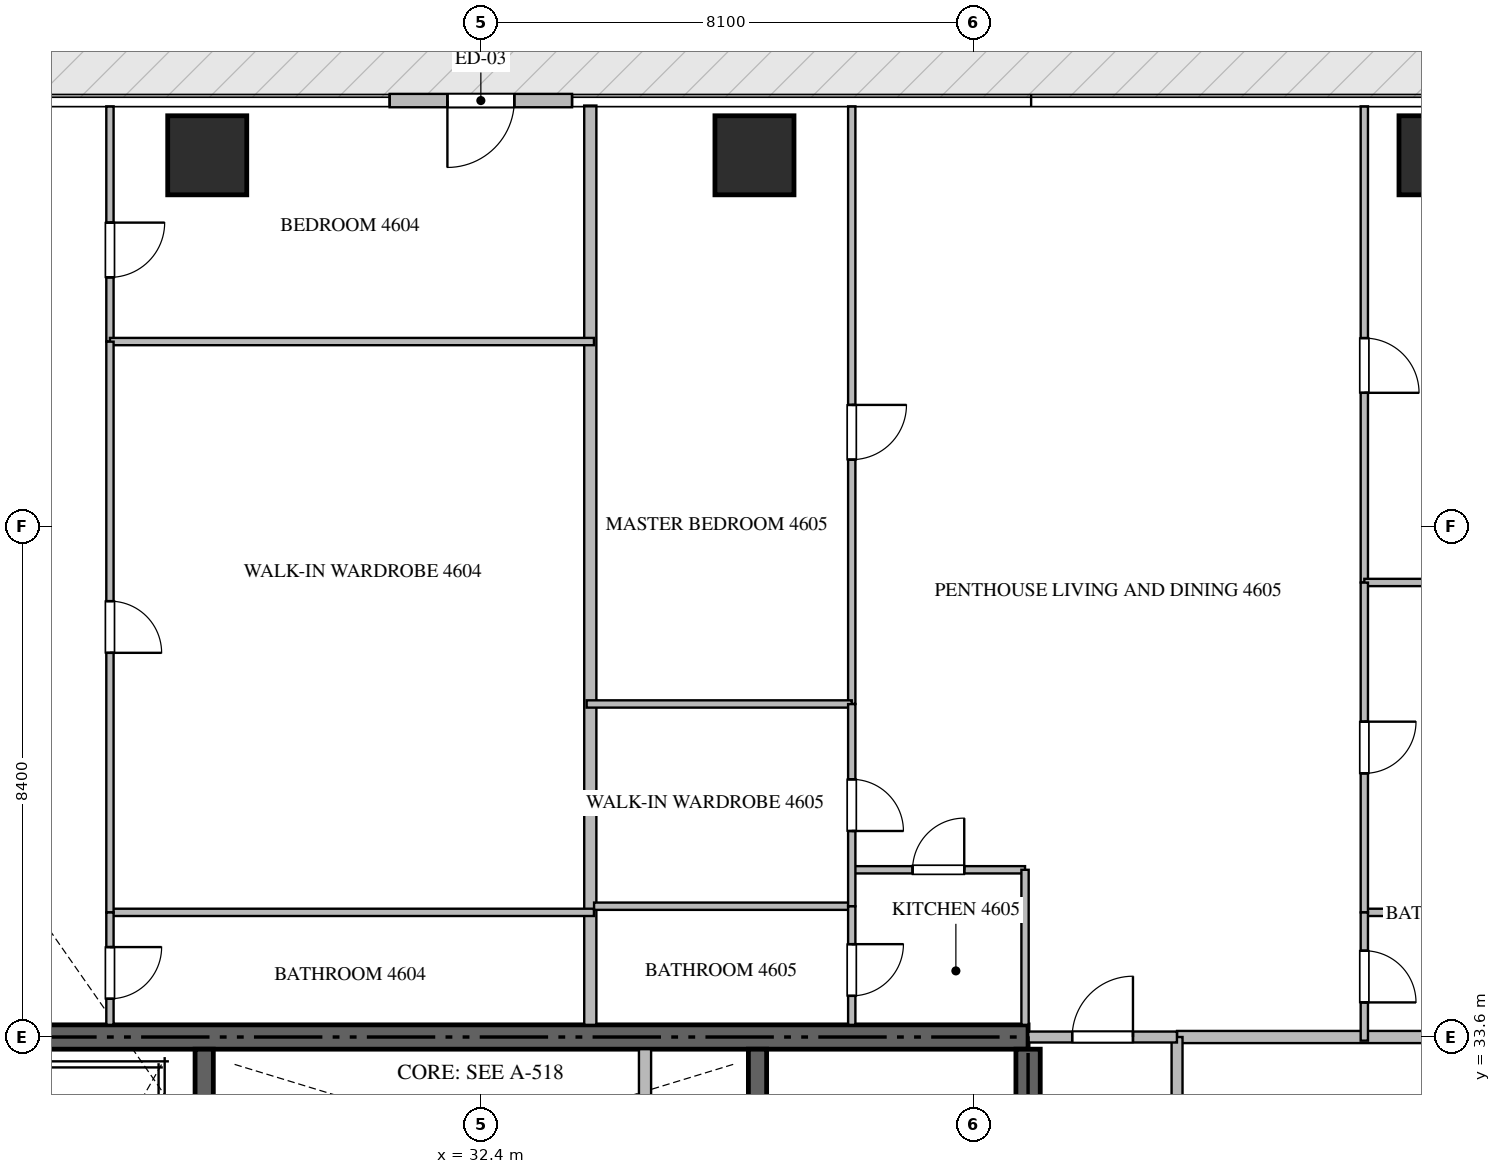
"""IFC4 building model, lengths in metres.
Left out: names, types, materials, properties, quantities, classifications, styles, units other than length and angle.
Written with IfcOpenShell. Run it as: python <this file> out.ifc"""

import sys

from ifc_helpers import new_model, si_unit, direction, frame, frame_2d, origin, origin_2d, place, context, subcontext, project, spatial, rectangle, extrude, source, transform, mapped, element, fill, save


model = new_model("IFC4")
c1 = context("Model", 3, precision=1e-05, world=origin(), true_north=direction((0.0, 1.0)))
c2 = subcontext(c1, "Body", "Model", "MODEL_VIEW")
j1 = project(units=[si_unit("LENGTHUNIT", "METRE"), si_unit("PLANEANGLEUNIT", "RADIAN")], contexts=[c1])
p1 = place(None, origin())
s1 = spatial("IfcSite", under=j1, at=p1, CompositionType="ELEMENT")
p2 = place(p1, origin())
s2 = spatial("IfcBuilding", under=s1, at=p2, CompositionType="ELEMENT")
p3 = place(p2, frame((0.0, 0.0, 183.9)))
s3 = spatial("IfcBuildingStorey", under=s2, at=p3, CompositionType="ELEMENT", Elevation=183.9)
p4 = place(p3, frame((41.4, 33.6, -0.26), z_axis=(0.0, 0.0, 1.0), x_axis=(-1.0, 0.0, 0.0)))
e1 = element("IfcWall", 1, at=p4, inside=s3, PredefinedType="SHEAR", context=c2, shape_type="SweptSolid", body=[
    extrude(rectangle(XDim=18.0, YDim=0.4, at=frame_2d((9.0, 0.0))), origin(), (0.0, 0.0, 1.0), 3.748),
])
p5 = place(p3, frame((41.4, 27.75, -0.26), z_axis=(0.0, 0.0, 1.0), x_axis=(0.0, 1.0, 0.0)))
e2 = element("IfcWall", 2, at=p5, inside=s3, PredefinedType="SHEAR", context=c2, shape_type="SweptSolid", body=[
    extrude(rectangle(XDim=5.65, YDim=0.4, at=frame_2d((2.825, 0.0))), origin(), (0.0, 0.0, 1.0), 3.748),
])
p6 = place(p3, frame((27.85, 23.55, -0.26), z_axis=(0.0, 0.0, 1.0), x_axis=(0.0, 1.0, 0.0)))
e3 = element("IfcWall", 3, at=p6, inside=s3, PredefinedType="SHEAR", context=c2, shape_type="SweptSolid", body=[
    extrude(rectangle(XDim=9.85, YDim=0.3, at=frame_2d((4.925, 0.0))), origin(), (0.0, 0.0, 1.0), 3.748),
])
p7 = place(p3, frame((36.95, 27.05, -0.26), z_axis=(0.0, 0.0, 1.0), x_axis=(0.0, 1.0, 0.0)))
e4 = element("IfcWall", 4, at=p7, inside=s3, PredefinedType="SHEAR", context=c2, shape_type="SweptSolid", body=[
    extrude(rectangle(XDim=6.35, YDim=0.3, at=frame_2d((3.175, 0.0))), origin(), (0.0, 0.0, 1.0), 3.748),
])
m1 = source(origin(), c2, "Body", "SweptSolid", [
    extrude(rectangle(XDim=1.3, YDim=1.3, at=origin_2d()), origin(), (0.0, 0.0, 1.0), 3.75),
])
for number, where, z_axis, x_axis in (
    (5, (27.9, 48.1, -0.26), (0.0, 0.0, 1.0), (1.0, 0.0, 0.0)),
    (6, (36.9, 48.1, -0.26), (0.0, 0.0, 1.0), (1.0, 0.0, 0.0)),
    (7, (48.15, 48.1, -0.26), (0.0, 0.0, 1.0), (1.0, 0.0, 0.0)),
):
    element("IfcColumn", number, at=place(p3, frame(where, z_axis=z_axis, x_axis=x_axis)), inside=s3, PredefinedType="COLUMN", context=c2, shape_type="MappedRepresentation", body=[
        mapped(m1, transform((0.0, 0.0, 0.0), scale=1.0)),
    ])
p8 = place(p3, frame((33.9, 49.0, 0.0), z_axis=(0.0, 0.0, 1.0), x_axis=(-1.0, 0.0, 0.0)))
e8 = element("IfcWall", 8, at=p8, inside=s3, PredefinedType="ELEMENTEDWALL", context=c2, shape_type="SweptSolid", body=[
    extrude(rectangle(XDim=3.0, YDim=0.22, at=frame_2d((1.5, 0.0))), origin(), (0.0, 0.0, 1.0), 3.475),
])
p9 = place(p8, frame((0.95, 0.0, 0.0)))
e9 = element("IfcOpeningElement", 9, at=p9, cuts=e8, PredefinedType="OPENING", context=c2, shape_type="SweptSolid", body=[
    extrude(rectangle(XDim=1.1, YDim=2.2, at=frame_2d((0.55, 1.1))), frame((0.0, 0.12, 0.0), z_axis=(0.0, -1.0, 0.0), x_axis=(1.0, 0.0, 0.0)), (0.0, 0.0, 1.0), 0.24),
])
p10 = place(p3, frame((35.1, 30.75, 0.0), z_axis=(0.0, 0.0, 1.0), x_axis=(0.0, 1.0, 0.0)))
e10 = element("IfcWall", 10, at=p10, inside=s3, PredefinedType="STANDARD", context=c2, shape_type="SweptSolid", body=[
    extrude(rectangle(XDim=2.65, YDim=0.2, at=frame_2d((1.325, 0.0))), origin(), (0.0, 0.0, 1.0), 3.49),
])
p11 = place(p3, frame((34.2, 33.8, 0.0), z_axis=(0.0, 0.0, 1.0), x_axis=(0.0, 1.0, 0.0)))
e11 = element("IfcWall", 11, at=p11, inside=s3, PredefinedType="PARTITIONING", context=c2, shape_type="SweptSolid", body=[
    extrude(rectangle(XDim=15.118, YDim=0.2, at=frame_2d((7.559, 0.0))), origin(), (0.0, 0.0, 1.0), 3.49),
])
p12 = place(p3, frame((43.85, 33.6, 0.0), z_axis=(0.0, 0.0, 1.0), x_axis=(1.0, 0.0, 0.0)))
e12 = element("IfcWall", 12, at=p12, inside=s3, PredefinedType="PARTITIONING", context=c2, shape_type="SweptSolid", body=[
    extrude(rectangle(XDim=13.068, YDim=0.2, at=frame_2d((6.534, 0.0))), origin(), (0.0, 0.0, 1.0), 3.49),
])
p13 = place(p3, frame((43.85, 14.9, 0.0), z_axis=(0.0, 0.0, 1.0), x_axis=(0.0, 1.0, 0.0)))
e13 = element("IfcWall", 13, at=p13, inside=s3, PredefinedType="PARTITIONING", context=c2, shape_type="SweptSolid", body=[
    extrude(rectangle(XDim=18.7, YDim=0.18, at=frame_2d((9.35, 0.0))), origin(), (0.0, 0.0, 1.0), 3.49),
])
p14 = place(p13, frame((1.805, 0.0, 0.0)))
e14 = element("IfcOpeningElement", 14, at=p14, cuts=e13, PredefinedType="OPENING", context=c2, shape_type="SweptSolid", body=[
    extrude(rectangle(XDim=1.0, YDim=2.15, at=frame_2d((0.5, 1.075))), frame((0.0, 0.1, 0.0), z_axis=(0.0, -1.0, 0.0), x_axis=(1.0, 0.0, 0.0)), (0.0, 0.0, 1.0), 0.2),
])
p15 = place(p13, frame((14.726, 0.0, 0.0)))
e15 = element("IfcOpeningElement", 15, at=p15, cuts=e13, PredefinedType="OPENING", context=c2, shape_type="SweptSolid", body=[
    extrude(rectangle(XDim=1.0, YDim=2.15, at=frame_2d((0.5, 1.075))), frame((0.0, 0.1, 0.0), z_axis=(0.0, -1.0, 0.0), x_axis=(1.0, 0.0, 0.0)), (0.0, 0.0, 1.0), 0.2),
])
p16 = place(p3, frame((41.402, 33.6, 0.0), z_axis=(0.0, 0.0, 1.0), x_axis=(1.0, 0.0, 0.0)))
e16 = element("IfcWall", 16, at=p16, inside=s3, PredefinedType="PARTITIONING", context=c2, shape_type="SweptSolid", body=[
    extrude(rectangle(XDim=2.446, YDim=0.18, at=frame_2d((1.223, 0.0))), origin(), (0.0, 0.0, 1.0), 3.49),
])
p17 = place(p16, frame((0.723, 0.0, 0.0)))
e17 = element("IfcOpeningElement", 17, at=p17, cuts=e16, PredefinedType="OPENING", context=c2, shape_type="SweptSolid", body=[
    extrude(rectangle(XDim=1.0, YDim=2.15, at=frame_2d((0.5, 1.075))), frame((0.0, 0.1, 0.0), z_axis=(0.0, -1.0, 0.0), x_axis=(1.0, 0.0, 0.0)), (0.0, 0.0, 1.0), 0.2),
])
p18 = place(p3, frame((26.3, 48.905, 0.0), z_axis=(0.0, 0.0, 1.0), x_axis=(0.0, -1.0, 0.0)))
e18 = element("IfcWall", 18, at=p18, inside=s3, PredefinedType="PARTITIONING", context=c2, shape_type="SweptSolid", body=[
    extrude(rectangle(XDim=3.868, YDim=0.12, at=frame_2d((1.934, 0.0))), origin(), (0.0, 0.0, 1.0), 3.49),
])
p19 = place(p18, frame((1.912, 0.0, 0.0)))
e19 = element("IfcOpeningElement", 19, at=p19, cuts=e18, PredefinedType="OPENING", context=c2, shape_type="SweptSolid", body=[
    extrude(rectangle(XDim=0.9, YDim=2.1, at=frame_2d((0.45, 1.05))), frame((0.0, 0.07, 0.0), z_axis=(0.0, -1.0, 0.0), x_axis=(1.0, 0.0, 0.0)), (0.0, 0.0, 1.0), 0.14),
])
for number, where, z_axis, x_axis in (
    (20, (26.3, 45.037, 0.0), (0.0, 0.0, 1.0), (1.0, 0.0, 0.0)),
    (21, (26.3, 35.65, 0.0), (0.0, 0.0, 1.0), (1.0, 0.0, 0.0)),
):
    element("IfcWall", number, at=place(p3, frame(where, z_axis=z_axis, x_axis=x_axis)), inside=s3, PredefinedType="PARTITIONING", context=c2, shape_type="SweptSolid", body=[
        extrude(rectangle(XDim=7.96, YDim=0.12, at=frame_2d((3.98, 0.0))), origin(), (0.0, 0.0, 1.0), 3.49),
    ])
p20 = place(p3, frame((26.3, 45.035, 0.0), z_axis=(0.0, 0.0, 1.0), x_axis=(0.0, -1.0, 0.0)))
e22 = element("IfcWall", 22, at=p20, inside=s3, PredefinedType="PARTITIONING", context=c2, shape_type="SweptSolid", body=[
    extrude(rectangle(XDim=9.385, YDim=0.12, at=frame_2d((4.692, 0.0))), origin(), (0.0, 0.0, 1.0), 3.49),
])
p21 = place(p20, frame((4.267, 0.0, 0.0)))
e23 = element("IfcOpeningElement", 23, at=p21, cuts=e22, PredefinedType="OPENING", context=c2, shape_type="SweptSolid", body=[
    extrude(rectangle(XDim=0.85, YDim=2.1, at=frame_2d((0.425, 1.05))), frame((0.0, 0.07, 0.0), z_axis=(0.0, -1.0, 0.0), x_axis=(1.0, 0.0, 0.0)), (0.0, 0.0, 1.0), 0.14),
])
p22 = place(p3, frame((26.3, 35.648, 0.0), z_axis=(0.0, 0.0, 1.0), x_axis=(0.0, -1.0, 0.0)))
e24 = element("IfcWall", 24, at=p22, inside=s3, PredefinedType="PARTITIONING", context=c2, shape_type="SweptSolid", body=[
    extrude(rectangle(XDim=1.848, YDim=0.12, at=frame_2d((0.924, 0.0))), origin(), (0.0, 0.0, 1.0), 3.49),
])
p23 = place(p22, frame((0.569, 0.0, 0.0)))
e25 = element("IfcOpeningElement", 25, at=p23, cuts=e24, PredefinedType="OPENING", context=c2, shape_type="SweptSolid", body=[
    extrude(rectangle(XDim=0.85, YDim=2.1, at=frame_2d((0.425, 1.05))), frame((0.0, 0.07, 0.0), z_axis=(0.0, -1.0, 0.0), x_axis=(1.0, 0.0, 0.0)), (0.0, 0.0, 1.0), 0.14),
])
p24 = place(p3, frame((38.5, 36.35, 0.0), z_axis=(0.0, 0.0, 1.0), x_axis=(1.0, 0.0, 0.0)))
e26 = element("IfcWall", 26, at=p24, inside=s3, PredefinedType="PARTITIONING", context=c2, shape_type="SweptSolid", body=[
    extrude(rectangle(XDim=2.85, YDim=0.12, at=frame_2d((1.425, 0.0))), origin(), (0.0, 0.0, 1.0), 3.49),
])
p25 = place(p24, frame((1.0, 0.0, 0.0)))
e27 = element("IfcOpeningElement", 27, at=p25, cuts=e26, PredefinedType="OPENING", context=c2, shape_type="SweptSolid", body=[
    extrude(rectangle(XDim=0.85, YDim=2.1, at=frame_2d((0.425, 1.05))), frame((0.0, 0.07, 0.0), z_axis=(0.0, -1.0, 0.0), x_axis=(1.0, 0.0, 0.0)), (0.0, 0.0, 1.0), 0.14),
])
p26 = place(p3, frame((41.35, 36.35, 0.0), z_axis=(0.0, 0.0, 1.0), x_axis=(0.0, -1.0, 0.0)))
e28 = element("IfcWall", 28, at=p26, inside=s3, PredefinedType="PARTITIONING", context=c2, shape_type="SweptSolid", body=[
    extrude(rectangle(XDim=2.55, YDim=0.12, at=frame_2d((1.275, 0.0))), origin(), (0.0, 0.0, 1.0), 3.49),
])
p27 = place(p3, frame((38.5, 48.905, 0.0), z_axis=(0.0, 0.0, 1.0), x_axis=(0.0, -1.0, 0.0)))
e29 = element("IfcWall", 29, at=p27, inside=s3, PredefinedType="PARTITIONING", context=c2, shape_type="SweptSolid", body=[
    extrude(rectangle(XDim=9.828, YDim=0.12, at=frame_2d((4.914, 0.0))), origin(), (0.0, 0.0, 1.0), 3.49),
])
p28 = place(p27, frame((4.91, 0.0, 0.0)))
e30 = element("IfcOpeningElement", 30, at=p28, cuts=e29, PredefinedType="OPENING", context=c2, shape_type="SweptSolid", body=[
    extrude(rectangle(XDim=0.9, YDim=2.1, at=frame_2d((0.45, 1.05))), frame((0.0, 0.07, 0.0), z_axis=(0.0, -1.0, 0.0), x_axis=(1.0, 0.0, 0.0)), (0.0, 0.0, 1.0), 0.14),
])
p29 = place(p3, frame((34.14, 39.077, 0.0), z_axis=(0.0, 0.0, 1.0), x_axis=(1.0, 0.0, 0.0)))
e31 = element("IfcWall", 31, at=p29, inside=s3, PredefinedType="PARTITIONING", context=c2, shape_type="SweptSolid", body=[
    extrude(rectangle(XDim=4.36, YDim=0.12, at=frame_2d((2.18, 0.0))), origin(), (0.0, 0.0, 1.0), 3.49),
])
p30 = place(p3, frame((34.262, 35.751, 0.0), z_axis=(0.0, 0.0, 1.0), x_axis=(1.0, 0.0, 0.0)))
e32 = element("IfcWall", 32, at=p30, inside=s3, PredefinedType="PARTITIONING", context=c2, shape_type="SweptSolid", body=[
    extrude(rectangle(XDim=4.238, YDim=0.12, at=frame_2d((2.119, 0.0))), origin(), (0.0, 0.0, 1.0), 3.49),
])
p31 = place(p3, frame((38.5, 39.075, 0.0), z_axis=(0.0, 0.0, 1.0), x_axis=(0.0, -1.0, 0.0)))
e33 = element("IfcWall", 33, at=p31, inside=s3, PredefinedType="PARTITIONING", context=c2, shape_type="SweptSolid", body=[
    extrude(rectangle(XDim=3.324, YDim=0.12, at=frame_2d((1.662, 0.0))), origin(), (0.0, 0.0, 1.0), 3.49),
])
p32 = place(p31, frame((1.237, 0.0, 0.0)))
e34 = element("IfcOpeningElement", 34, at=p32, cuts=e33, PredefinedType="OPENING", context=c2, shape_type="SweptSolid", body=[
    extrude(rectangle(XDim=0.85, YDim=2.1, at=frame_2d((0.425, 1.05))), frame((0.0, 0.07, 0.0), z_axis=(0.0, -1.0, 0.0), x_axis=(1.0, 0.0, 0.0)), (0.0, 0.0, 1.0), 0.14),
])
p33 = place(p3, frame((38.5, 35.749, 0.0), z_axis=(0.0, 0.0, 1.0), x_axis=(0.0, -1.0, 0.0)))
e35 = element("IfcWall", 35, at=p33, inside=s3, PredefinedType="PARTITIONING", context=c2, shape_type="SweptSolid", body=[
    extrude(rectangle(XDim=1.949, YDim=0.12, at=frame_2d((0.975, 0.0))), origin(), (0.0, 0.0, 1.0), 3.49),
])
p34 = place(p33, frame((0.622, 0.0, 0.0)))
e36 = element("IfcOpeningElement", 36, at=p34, cuts=e35, PredefinedType="OPENING", context=c2, shape_type="SweptSolid", body=[
    extrude(rectangle(XDim=0.85, YDim=2.1, at=frame_2d((0.425, 1.05))), frame((0.0, 0.07, 0.0), z_axis=(0.0, -1.0, 0.0), x_axis=(1.0, 0.0, 0.0)), (0.0, 0.0, 1.0), 0.14),
])
p35 = place(p3, frame((46.93, 48.905, 0.0), z_axis=(0.0, 0.0, 1.0), x_axis=(0.0, -1.0, 0.0)))
e37 = element("IfcWall", 37, at=p35, inside=s3, PredefinedType="PARTITIONING", context=c2, shape_type="SweptSolid", body=[
    extrude(rectangle(XDim=7.83, YDim=0.12, at=frame_2d((3.915, 0.0))), origin(), (0.0, 0.0, 1.0), 3.49),
])
p36 = place(p35, frame((3.811, 0.0, 0.0)))
e38 = element("IfcOpeningElement", 38, at=p36, cuts=e37, PredefinedType="OPENING", context=c2, shape_type="SweptSolid", body=[
    extrude(rectangle(XDim=0.9, YDim=2.1, at=frame_2d((0.45, 1.05))), frame((0.0, 0.07, 0.0), z_axis=(0.0, -1.0, 0.0), x_axis=(1.0, 0.0, 0.0)), (0.0, 0.0, 1.0), 0.14),
])
p37 = place(p3, frame((46.93, 41.075, 0.0), z_axis=(0.0, 0.0, 1.0), x_axis=(1.0, 0.0, 0.0)))
e39 = element("IfcWall", 39, at=p37, inside=s3, PredefinedType="PARTITIONING", context=c2, shape_type="SweptSolid", body=[
    extrude(rectangle(XDim=5.975, YDim=0.12, at=frame_2d((2.988, 0.0))), origin(), (0.0, 0.0, 1.0), 3.49),
])
p38 = place(p3, frame((46.93, 35.65, 0.0), z_axis=(0.0, 0.0, 1.0), x_axis=(1.0, 0.0, 0.0)))
e40 = element("IfcWall", 40, at=p38, inside=s3, PredefinedType="PARTITIONING", context=c2, shape_type="SweptSolid", body=[
    extrude(rectangle(XDim=3.2, YDim=0.12, at=frame_2d((1.6, 0.0))), origin(), (0.0, 0.0, 1.0), 3.49),
])
p39 = place(p3, frame((46.93, 41.073, 0.0), z_axis=(0.0, 0.0, 1.0), x_axis=(0.0, -1.0, 0.0)))
e41 = element("IfcWall", 41, at=p39, inside=s3, PredefinedType="PARTITIONING", context=c2, shape_type="SweptSolid", body=[
    extrude(rectangle(XDim=5.423, YDim=0.12, at=frame_2d((2.711, 0.0))), origin(), (0.0, 0.0, 1.0), 3.49),
])
p40 = place(p39, frame((2.287, 0.0, 0.0)))
e42 = element("IfcOpeningElement", 42, at=p40, cuts=e41, PredefinedType="OPENING", context=c2, shape_type="SweptSolid", body=[
    extrude(rectangle(XDim=0.85, YDim=2.1, at=frame_2d((0.425, 1.05))), frame((0.0, 0.07, 0.0), z_axis=(0.0, -1.0, 0.0), x_axis=(1.0, 0.0, 0.0)), (0.0, 0.0, 1.0), 0.14),
])
p41 = place(p3, frame((46.93, 35.648, 0.0), z_axis=(0.0, 0.0, 1.0), x_axis=(0.0, -1.0, 0.0)))
e43 = element("IfcWall", 43, at=p41, inside=s3, PredefinedType="PARTITIONING", context=c2, shape_type="SweptSolid", body=[
    extrude(rectangle(XDim=2.108, YDim=0.12, at=frame_2d((1.054, 0.0))), origin(), (0.0, 0.0, 1.0), 3.49),
])
p42 = place(p41, frame((0.629, 0.0, 0.0)))
e44 = element("IfcOpeningElement", 44, at=p42, cuts=e43, PredefinedType="OPENING", context=c2, shape_type="SweptSolid", body=[
    extrude(rectangle(XDim=0.85, YDim=2.1, at=frame_2d((0.425, 1.05))), frame((0.0, 0.07, 0.0), z_axis=(0.0, -1.0, 0.0), x_axis=(1.0, 0.0, 0.0)), (0.0, 0.0, 1.0), 0.14),
])
m2 = source(origin(), c2, "Body", "SweptSolid", [
    extrude(rectangle(XDim=1.1, YDim=2.2, at=frame_2d((0.55, 1.1))), frame((0.0, 0.025, 0.0), z_axis=(0.0, -1.0, 0.0), x_axis=(1.0, 0.0, 0.0)), (0.0, 0.0, 1.0), 0.05),
])
p43 = place(p9, origin())
e45 = element("IfcDoor", 45, at=p43, inside=s3, OperationType="SINGLE_SWING_RIGHT", PredefinedType="DOOR", context=c2, shape_type="MappedRepresentation", body=[
    mapped(m2, transform((0.0, 0.0, 0.0), scale=1.0)),
])
fill(e9, e45)
m3 = source(origin(), c2, "Body", "SweptSolid", [
    extrude(rectangle(XDim=1.0, YDim=2.15, at=frame_2d((0.5, 1.075))), frame((0.0, 0.025, 0.0), z_axis=(0.0, -1.0, 0.0), x_axis=(1.0, 0.0, 0.0)), (0.0, 0.0, 1.0), 0.05),
])
p44 = place(p17, origin())
e46 = element("IfcDoor", 46, at=p44, inside=s3, OperationType="SINGLE_SWING_RIGHT", PredefinedType="DOOR", context=c2, shape_type="MappedRepresentation", body=[
    mapped(m3, transform((0.0, 0.0, 0.0), scale=1.0)),
])
fill(e17, e46)
m4 = source(origin(), c2, "Body", "SweptSolid", [
    extrude(rectangle(XDim=0.9, YDim=2.1, at=frame_2d((0.45, 1.05))), frame((0.0, 0.025, 0.0), z_axis=(0.0, -1.0, 0.0), x_axis=(1.0, 0.0, 0.0)), (0.0, 0.0, 1.0), 0.05),
])
p45 = place(p19, origin())
e47 = element("IfcDoor", 47, at=p45, inside=s3, OperationType="SINGLE_SWING_LEFT", PredefinedType="DOOR", context=c2, shape_type="MappedRepresentation", body=[
    mapped(m4, transform((0.0, 0.0, 0.0), scale=1.0)),
])
fill(e19, e47)
m5 = source(origin(), c2, "Body", "SweptSolid", [
    extrude(rectangle(XDim=0.85, YDim=2.1, at=frame_2d((0.425, 1.05))), frame((0.0, 0.025, 0.0), z_axis=(0.0, -1.0, 0.0), x_axis=(1.0, 0.0, 0.0)), (0.0, 0.0, 1.0), 0.05),
])
p46 = place(p21, origin())
e48 = element("IfcDoor", 48, at=p46, inside=s3, OperationType="SINGLE_SWING_RIGHT", PredefinedType="DOOR", context=c2, shape_type="MappedRepresentation", body=[
    mapped(m5, transform((0.0, 0.0, 0.0), scale=1.0)),
])
fill(e23, e48)
p47 = place(p23, origin())
e49 = element("IfcDoor", 49, at=p47, inside=s3, OperationType="SINGLE_SWING_LEFT", PredefinedType="DOOR", context=c2, shape_type="MappedRepresentation", body=[
    mapped(m5, transform((0.0, 0.0, 0.0), scale=1.0)),
])
fill(e25, e49)
p48 = place(p25, origin())
e50 = element("IfcDoor", 50, at=p48, inside=s3, OperationType="SINGLE_SWING_RIGHT", PredefinedType="DOOR", context=c2, shape_type="MappedRepresentation", body=[
    mapped(m5, transform((0.0, 0.0, 0.0), scale=1.0)),
])
fill(e27, e50)
p49 = place(p28, origin())
e51 = element("IfcDoor", 51, at=p49, inside=s3, OperationType="SINGLE_SWING_LEFT", PredefinedType="DOOR", context=c2, shape_type="MappedRepresentation", body=[
    mapped(m4, transform((0.0, 0.0, 0.0), scale=1.0)),
])
fill(e30, e51)
p50 = place(p32, origin())
e52 = element("IfcDoor", 52, at=p50, inside=s3, OperationType="SINGLE_SWING_RIGHT", PredefinedType="DOOR", context=c2, shape_type="MappedRepresentation", body=[
    mapped(m5, transform((0.0, 0.0, 0.0), scale=1.0)),
])
fill(e34, e52)
p51 = place(p34, origin())
e53 = element("IfcDoor", 53, at=p51, inside=s3, OperationType="SINGLE_SWING_LEFT", PredefinedType="DOOR", context=c2, shape_type="MappedRepresentation", body=[
    mapped(m5, transform((0.0, 0.0, 0.0), scale=1.0)),
])
fill(e36, e53)
p52 = place(p36, origin())
e54 = element("IfcDoor", 54, at=p52, inside=s3, OperationType="SINGLE_SWING_RIGHT", PredefinedType="DOOR", context=c2, shape_type="MappedRepresentation", body=[
    mapped(m4, transform((0.0, 0.0, 0.0), scale=1.0)),
])
fill(e38, e54)
p53 = place(p40, origin())
e55 = element("IfcDoor", 55, at=p53, inside=s3, OperationType="SINGLE_SWING_LEFT", PredefinedType="DOOR", context=c2, shape_type="MappedRepresentation", body=[
    mapped(m5, transform((0.0, 0.0, 0.0), scale=1.0)),
])
fill(e42, e55)
p54 = place(p42, origin())
e56 = element("IfcDoor", 56, at=p54, inside=s3, OperationType="SINGLE_SWING_RIGHT", PredefinedType="DOOR", context=c2, shape_type="MappedRepresentation", body=[
    mapped(m5, transform((0.0, 0.0, 0.0), scale=1.0)),
])
fill(e44, e56)
save(model, sys.argv[1])
